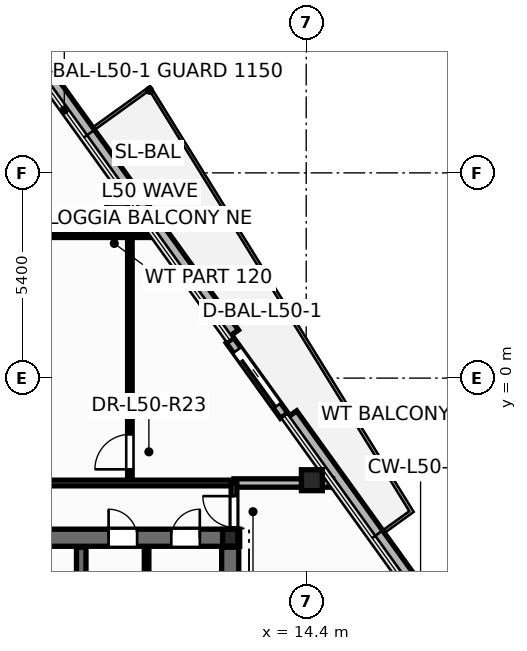
"""IFC4 building model, lengths in metres.
Left out: names, types, materials, properties, quantities, classifications, styles, units other than length and angle.
Written with IfcOpenShell. Run it as: python <this file> out.ifc"""

import sys

from ifc_helpers import new_model, si_unit, direction, frame, frame_2d, origin, origin_2d, place, context, subcontext, project, spatial, rectangle, hollow_circle, i_section, extrude, element, fill, save


model = new_model("IFC4")
c1 = context("Model", 3, precision=1e-05, world=origin(), true_north=direction((0.0, 1.0)))
c2 = subcontext(c1, "Body", "Model", "MODEL_VIEW")
j1 = project(units=[si_unit("LENGTHUNIT", "METRE"), si_unit("PLANEANGLEUNIT", "RADIAN")], contexts=[c1])
p1 = place(None, origin())
s1 = spatial("IfcSite", under=j1, at=p1, CompositionType="ELEMENT")
p2 = place(p1, origin())
s2 = spatial("IfcBuilding", under=s1, at=p2, CompositionType="ELEMENT")
p3 = place(p2, frame((0.0, 0.0, 192.9)))
s3 = spatial("IfcBuildingStorey", under=s2, at=p3, CompositionType="ELEMENT", Elevation=192.9)
for number, where, z_axis, x_axis in (
    (1, (14.549, -2.686, 0.0), (0.0, 0.0, 1.0), (1.0, 0.0, 0.0)),
    (2, (9.427, 4.433, 0.0), (0.0, 0.0, 1.0), (1.0, 0.0, 0.0)),
):
    element("IfcColumn", number, at=place(p3, frame(where, z_axis=z_axis, x_axis=x_axis)), inside=s3, PredefinedType="COLUMN", context=c2, shape_type="SweptSolid", body=[
        extrude(hollow_circle(Radius=0.275, WallThickness=0.024, at=origin_2d()), origin(), (0.0, 0.0, 1.0), 3.6),
    ])
p4 = place(p3, frame((12.4, -4.2, 0.0), z_axis=(0.0, 0.0, 1.0), x_axis=(1.0, 0.0, 0.0)))
e3 = element("IfcColumn", 3, at=p4, inside=s3, PredefinedType="COLUMN", context=c2, shape_type="SweptSolid", body=[
    extrude(i_section(OverallWidth=0.4, OverallDepth=0.44, WebThickness=0.028, FlangeThickness=0.04, at=origin_2d()), origin(), (0.0, 0.0, 1.0), 3.6),
])
p5 = place(p3, frame((21.077, -10.801, -0.2), z_axis=(0.0, 0.0, 1.0), x_axis=(-0.583976071479, 0.811770871576, 0.0)))
e4 = element("IfcWall", 4, at=p5, inside=s3, PredefinedType="PARAPET", context=c2, shape_type="SweptSolid", body=[
    extrude(rectangle(XDim=12.115, YDim=0.36, at=frame_2d((6.058, 0.0))), origin(), (0.0, 0.0, 1.0), 0.38),
])
p6 = place(p3, frame((12.472, 1.16, -0.2), z_axis=(0.0, 0.0, 1.0), x_axis=(-0.583990323954, 0.811760618365, 0.0)))
e5 = element("IfcWall", 5, at=p6, inside=s3, PredefinedType="PARAPET", context=c2, shape_type="SweptSolid", body=[
    extrude(rectangle(XDim=14.751, YDim=0.36, at=frame_2d((7.375, 0.0))), origin(), (0.0, 0.0, 1.0), 0.38),
])
p7 = place(p3, frame((13.819, -0.987, -0.015), z_axis=(0.0, 0.0, 1.0), x_axis=(-0.583951454754, 0.811788579921, 0.0)))
e6 = element("IfcWall", 6, at=p7, inside=s3, PredefinedType="STANDARD", context=c2, shape_type="SweptSolid", body=[
    extrude(rectangle(XDim=2.44, YDim=0.24, at=frame_2d((1.22, 0.0))), origin(), (0.0, 0.0, 1.0), 2.807),
])
p8 = place(p7, frame((0.32, 0.0, 0.015)))
e7 = element("IfcOpeningElement", 7, at=p8, cuts=e6, PredefinedType="OPENING", context=c2, shape_type="SweptSolid", body=[
    extrude(rectangle(XDim=1.806, YDim=2.204, at=frame_2d((0.9, 1.102))), frame((0.0, 0.13, 0.0), z_axis=(0.0, -1.0, 0.0), x_axis=(1.0, 0.0, 0.0)), (0.0, 0.0, 1.0), 0.26),
])
p9 = place(p3, frame((10.2, -5.52, 0.0), z_axis=(0.0, 0.0, 1.0), x_axis=(0.0, 1.0, 0.0)))
e8 = element("IfcWall", 8, at=p9, inside=s3, PredefinedType="PARTITIONING", context=c2, shape_type="SweptSolid", body=[
    extrude(rectangle(XDim=1.12, YDim=0.12, at=frame_2d((0.56, 0.0))), origin(), (0.0, 0.0, 1.0), 3.35),
])
p10 = place(p3, frame((-12.65, -4.2, 0.0), z_axis=(0.0, 0.0, 1.0), x_axis=(1.0, 0.0, 0.0)))
e9 = element("IfcWall", 9, at=p10, inside=s3, PredefinedType="SHEAR", context=c2, shape_type="SweptSolid", body=[
    extrude(rectangle(XDim=25.3, YDim=0.45, at=frame_2d((12.65, 0.0))), origin(), (0.0, 0.0, 1.0), 3.6),
])
p11 = place(p10, frame((0.95, 0.0, 0.0)))
e10 = element("IfcOpeningElement", 10, at=p11, cuts=e9, PredefinedType="OPENING", context=c2, shape_type="SweptSolid", body=[
    extrude(rectangle(XDim=0.756, YDim=2.054, at=frame_2d((0.375, 1.027))), frame((0.0, 0.235, 0.0), z_axis=(0.0, -1.0, 0.0), x_axis=(1.0, 0.0, 0.0)), (0.0, 0.0, 1.0), 0.47),
])
p12 = place(p10, frame((2.6, 0.0, 0.0)))
e11 = element("IfcOpeningElement", 11, at=p12, cuts=e9, PredefinedType="OPENING", context=c2, shape_type="SweptSolid", body=[
    extrude(rectangle(XDim=0.756, YDim=2.054, at=frame_2d((0.375, 1.027))), frame((0.0, 0.235, 0.0), z_axis=(0.0, -1.0, 0.0), x_axis=(1.0, 0.0, 0.0)), (0.0, 0.0, 1.0), 0.47),
])
p13 = place(p10, frame((21.85, 0.0, 0.0)))
e12 = element("IfcOpeningElement", 12, at=p13, cuts=e9, PredefinedType="OPENING", context=c2, shape_type="SweptSolid", body=[
    extrude(rectangle(XDim=0.756, YDim=2.054, at=frame_2d((0.375, 1.027))), frame((0.0, 0.235, 0.0), z_axis=(0.0, -1.0, 0.0), x_axis=(1.0, 0.0, 0.0)), (0.0, 0.0, 1.0), 0.47),
])
p14 = place(p10, frame((23.5, 0.0, 0.0)))
e13 = element("IfcOpeningElement", 13, at=p14, cuts=e9, PredefinedType="OPENING", context=c2, shape_type="SweptSolid", body=[
    extrude(rectangle(XDim=0.756, YDim=2.054, at=frame_2d((0.375, 1.027))), frame((0.0, 0.235, 0.0), z_axis=(0.0, -1.0, 0.0), x_axis=(1.0, 0.0, 0.0)), (0.0, 0.0, 1.0), 0.47),
])
p15 = place(p10, frame((5.85, 0.0, 0.0)))
e14 = element("IfcOpeningElement", 14, at=p15, cuts=e9, PredefinedType="OPENING", context=c2, shape_type="SweptSolid", body=[
    extrude(rectangle(XDim=1.006, YDim=2.104, at=frame_2d((0.5, 1.052))), frame((0.0, 0.235, 0.0), z_axis=(0.0, -1.0, 0.0), x_axis=(1.0, 0.0, 0.0)), (0.0, 0.0, 1.0), 0.47),
])
p16 = place(p10, frame((10.35, 0.0, 0.0)))
e15 = element("IfcOpeningElement", 15, at=p16, cuts=e9, PredefinedType="OPENING", context=c2, shape_type="SweptSolid", body=[
    extrude(rectangle(XDim=1.406, YDim=2.154, at=frame_2d((0.7, 1.077))), frame((0.0, 0.235, 0.0), z_axis=(0.0, -1.0, 0.0), x_axis=(1.0, 0.0, 0.0)), (0.0, 0.0, 1.0), 0.47),
])
p17 = place(p10, frame((18.45, 0.0, 0.0)))
e16 = element("IfcOpeningElement", 16, at=p17, cuts=e9, PredefinedType="OPENING", context=c2, shape_type="SweptSolid", body=[
    extrude(rectangle(XDim=1.006, YDim=2.104, at=frame_2d((0.5, 1.052))), frame((0.0, 0.235, 0.0), z_axis=(0.0, -1.0, 0.0), x_axis=(1.0, 0.0, 0.0)), (0.0, 0.0, 1.0), 0.47),
])
p18 = place(p3, frame((8.48, -13.85, 0.0), z_axis=(0.0, 0.0, 1.0), x_axis=(0.0, 1.0, 0.0)))
e17 = element("IfcWall", 17, at=p18, inside=s3, PredefinedType="SHEAR", context=c2, shape_type="SweptSolid", body=[
    extrude(rectangle(XDim=9.4, YDim=0.25, at=frame_2d((4.7, 0.0))), origin(), (0.0, 0.0, 1.0), 3.6),
])
p19 = place(p18, frame((6.95, 0.0, 0.0)))
e18 = element("IfcOpeningElement", 18, at=p19, cuts=e17, PredefinedType="OPENING", context=c2, shape_type="SweptSolid", body=[
    extrude(rectangle(XDim=1.006, YDim=2.104, at=frame_2d((0.5, 1.052))), frame((0.0, 0.135, 0.0), z_axis=(0.0, -1.0, 0.0), x_axis=(1.0, 0.0, 0.0)), (0.0, 0.0, 1.0), 0.27),
])
p20 = place(p3, frame((12.4, -13.85, 0.0), z_axis=(0.0, 0.0, 1.0), x_axis=(0.0, 1.0, 0.0)))
e19 = element("IfcWall", 19, at=p20, inside=s3, PredefinedType="SHEAR", context=c2, shape_type="SweptSolid", body=[
    extrude(rectangle(XDim=9.4, YDim=0.45, at=frame_2d((4.7, 0.0))), origin(), (0.0, 0.0, 1.0), 3.6),
])
p21 = place(p3, frame((9.76, -2.76, 0.0), z_axis=(0.0, 0.0, 1.0), x_axis=(0.0, 1.0, 0.0)))
e20 = element("IfcWall", 20, at=p21, inside=s3, PredefinedType="PARTITIONING", context=c2, shape_type="SweptSolid", body=[
    extrude(rectangle(XDim=7.416, YDim=0.12, at=frame_2d((3.708, 0.0))), origin(), (0.0, 0.0, 1.0), 2.625),
])
p22 = place(p21, frame((0.36, 0.0, 0.0)))
e21 = element("IfcOpeningElement", 21, at=p22, cuts=e20, PredefinedType="OPENING", context=c2, shape_type="SweptSolid", body=[
    extrude(rectangle(XDim=0.926, YDim=2.104, at=frame_2d((0.46, 1.052))), frame((0.0, 0.07, 0.0), z_axis=(0.0, -1.0, 0.0), x_axis=(1.0, 0.0, 0.0)), (0.0, 0.0, 1.0), 0.14),
])
p23 = place(p3, frame((5.12, 3.76, 0.0), z_axis=(0.0, 0.0, 1.0), x_axis=(1.0, 0.0, 0.0)))
e22 = element("IfcWall", 22, at=p23, inside=s3, PredefinedType="PARTITIONING", context=c2, shape_type="SweptSolid", body=[
    extrude(rectangle(XDim=5.284, YDim=0.12, at=frame_2d((2.642, 0.0))), origin(), (0.0, 0.0, 1.0), 2.625),
])
p24 = place(p23, frame((0.397, 0.0, 0.0)))
e23 = element("IfcOpeningElement", 23, at=p24, cuts=e22, PredefinedType="OPENING", context=c2, shape_type="SweptSolid", body=[
    extrude(rectangle(XDim=0.926, YDim=2.104, at=frame_2d((0.46, 1.052))), frame((0.0, 0.07, 0.0), z_axis=(0.0, -1.0, 0.0), x_axis=(1.0, 0.0, 0.0)), (0.0, 0.0, 1.0), 0.14),
])
p25 = place(p3, frame((-4.318, -2.76, 0.0), z_axis=(0.0, 0.0, 1.0), x_axis=(1.0, 0.0, 0.0)))
e24 = element("IfcWall", 24, at=p25, inside=s3, PredefinedType="PARTITIONING", context=c2, shape_type="SweptSolid", body=[
    extrude(rectangle(XDim=16.818, YDim=0.15, at=frame_2d((8.409, 0.0))), origin(), (0.0, 0.0, 1.0), 2.325),
])
p26 = place(p3, frame((12.5, -2.76, 0.0), z_axis=(0.0, 0.0, 1.0), x_axis=(1.0, 0.0, 0.0)))
e25 = element("IfcWall", 25, at=p26, inside=s3, PredefinedType="PARTITIONING", context=c2, shape_type="SweptSolid", body=[
    extrude(rectangle(XDim=2.595, YDim=0.22, at=frame_2d((1.297, 0.0))), origin(), (0.0, 0.0, 1.0), 2.625),
])
p27 = place(p3, frame((12.5, -4.24, 0.0), z_axis=(0.0, 0.0, 1.0), x_axis=(0.0, 1.0, 0.0)))
e26 = element("IfcWall", 26, at=p27, inside=s3, PredefinedType="PARTITIONING", context=c2, shape_type="SweptSolid", body=[
    extrude(rectangle(XDim=1.48, YDim=0.15, at=frame_2d((0.74, 0.0))), origin(), (0.0, 0.0, 1.0), 2.325),
])
p28 = place(p27, frame((0.315, 0.0, 0.0)))
e27 = element("IfcOpeningElement", 27, at=p28, cuts=e26, PredefinedType="OPENING", context=c2, shape_type="SweptSolid", body=[
    extrude(rectangle(XDim=0.826, YDim=2.104, at=frame_2d((0.41, 1.052))), frame((0.0, 0.085, 0.0), z_axis=(0.0, -1.0, 0.0), x_axis=(1.0, 0.0, 0.0)), (0.0, 0.0, 1.0), 0.17),
])
p29 = place(p8, origin())
e28 = element("IfcDoor", 28, at=p29, inside=s3, OperationType="SLIDING_TO_LEFT", PredefinedType="DOOR", context=c2, shape_type="SweptSolid", body=[
    extrude(rectangle(XDim=1.8, YDim=2.2, at=frame_2d((0.9, 1.1))), frame((0.0, 0.025, 0.0), z_axis=(0.0, -1.0, 0.0), x_axis=(1.0, 0.0, 0.0)), (0.0, 0.0, 1.0), 0.05),
])
fill(e7, e28)
p30 = place(p13, origin())
e29 = element("IfcDoor", 29, at=p30, inside=s3, OperationType="SINGLE_SWING_LEFT", PredefinedType="DOOR", context=c2, shape_type="SweptSolid", body=[
    extrude(rectangle(XDim=0.75, YDim=2.05, at=frame_2d((0.375, 1.025))), frame((0.0, 0.025, 0.0), z_axis=(0.0, -1.0, 0.0), x_axis=(1.0, 0.0, 0.0)), (0.0, 0.0, 1.0), 0.05),
])
fill(e12, e29)
p31 = place(p14, origin())
e30 = element("IfcDoor", 30, at=p31, inside=s3, OperationType="SINGLE_SWING_RIGHT", PredefinedType="DOOR", context=c2, shape_type="SweptSolid", body=[
    extrude(rectangle(XDim=0.75, YDim=2.05, at=frame_2d((0.375, 1.025))), frame((0.0, 0.025, 0.0), z_axis=(0.0, -1.0, 0.0), x_axis=(1.0, 0.0, 0.0)), (0.0, 0.0, 1.0), 0.05),
])
fill(e13, e30)
p32 = place(p28, origin())
e31 = element("IfcDoor", 31, at=p32, inside=s3, OperationType="SINGLE_SWING_RIGHT", PredefinedType="DOOR", context=c2, shape_type="SweptSolid", body=[
    extrude(rectangle(XDim=0.82, YDim=2.1, at=frame_2d((0.41, 1.05))), frame((0.0, 0.025, 0.0), z_axis=(0.0, -1.0, 0.0), x_axis=(1.0, 0.0, 0.0)), (0.0, 0.0, 1.0), 0.05),
])
fill(e27, e31)
p33 = place(p22, origin())
e32 = element("IfcDoor", 32, at=p33, inside=s3, OperationType="SINGLE_SWING_LEFT", PredefinedType="DOOR", context=c2, shape_type="SweptSolid", body=[
    extrude(rectangle(XDim=0.92, YDim=2.1, at=frame_2d((0.46, 1.05))), frame((0.0, 0.025, 0.0), z_axis=(0.0, -1.0, 0.0), x_axis=(1.0, 0.0, 0.0)), (0.0, 0.0, 1.0), 0.05),
])
fill(e21, e32)
save(model, sys.argv[1])
